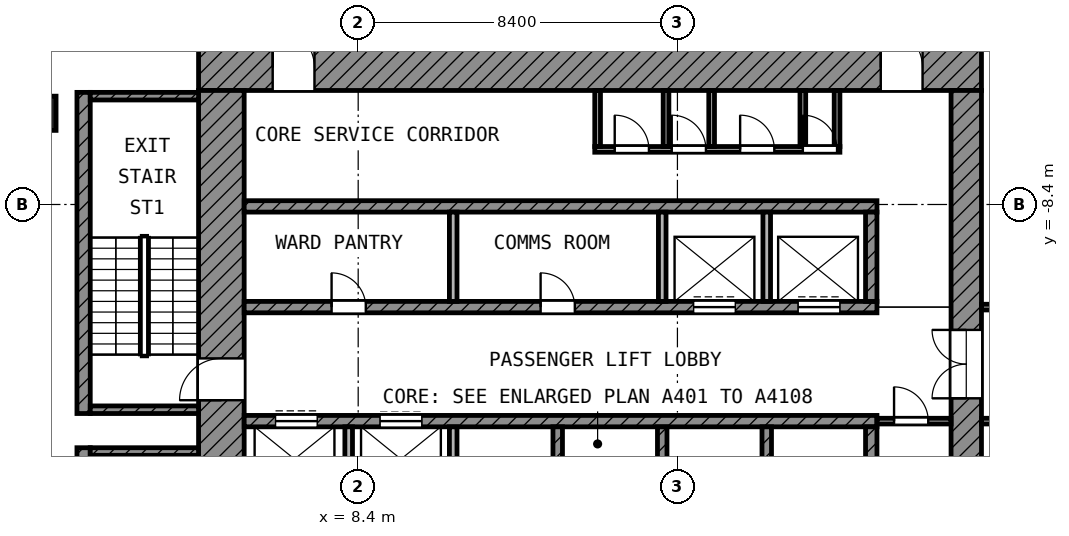
"""IFC4 building model, lengths in metres.
Left out: names, types, materials, properties, quantities, classifications, styles, units other than length and angle.
Written with IfcOpenShell. Run it as: python <this file> out.ifc"""

import sys

from ifc_helpers import new_model, si_unit, direction, frame, frame_2d, origin, origin_2d, place, context, subcontext, project, spatial, rectangle, extrude, element, fill, save


model = new_model("IFC4")
c1 = context("Model", 3, precision=1e-05, world=origin(), true_north=direction((0.0, 1.0)))
c2 = subcontext(c1, "Body", "Model", "MODEL_VIEW")
j1 = project(units=[si_unit("LENGTHUNIT", "METRE"), si_unit("PLANEANGLEUNIT", "RADIAN")], contexts=[c1])
p1 = place(None, origin())
s1 = spatial("IfcSite", under=j1, at=p1, CompositionType="ELEMENT")
p2 = place(p1, origin())
s2 = spatial("IfcBuilding", under=s1, at=p2, CompositionType="ELEMENT")
p3 = place(p2, frame((0.0, 0.0, 234.8)))
s3 = spatial("IfcBuildingStorey", under=s2, at=p3, CompositionType="ELEMENT", Elevation=234.8)
p4 = place(p3, frame((0.0, -6.0, 0.0), z_axis=(0.0, 0.0, 1.0), x_axis=(1.0, 0.0, 0.0)))
e1 = element("IfcColumn", 1, at=p4, inside=s3, PredefinedType="COLUMN", context=c2, shape_type="SweptSolid", body=[
    extrude(rectangle(XDim=0.9, YDim=0.9, at=origin_2d()), origin(), (0.0, 0.0, 1.0), 4.2),
])
p5 = place(p3, frame((4.2, -4.8, 0.0), z_axis=(0.0, 0.0, 1.0), x_axis=(1.0, 0.0, 0.0)))
e2 = element("IfcWall", 2, at=p5, inside=s3, PredefinedType="SHEAR", context=c2, shape_type="SweptSolid", body=[
    extrude(rectangle(XDim=20.6, YDim=1.2, at=frame_2d((10.3, 0.0))), origin(), (0.0, 0.0, 1.0), 3.6),
])
p6 = place(p5, frame((1.95, 0.0, 0.0)))
e3 = element("IfcOpeningElement", 3, at=p6, cuts=e2, PredefinedType="OPENING", context=c2, shape_type="SweptSolid", body=[
    extrude(rectangle(XDim=1.1, YDim=2.1, at=frame_2d((0.55, 1.05))), frame((0.0, 0.61, 0.0), z_axis=(0.0, -1.0, 0.0), x_axis=(1.0, 0.0, 0.0)), (0.0, 0.0, 1.0), 1.22),
])
p7 = place(p5, frame((17.95, 0.0, 0.0)))
e4 = element("IfcOpeningElement", 4, at=p7, cuts=e2, PredefinedType="OPENING", context=c2, shape_type="SweptSolid", body=[
    extrude(rectangle(XDim=1.1, YDim=2.1, at=frame_2d((0.55, 1.05))), frame((0.0, 0.61, 0.0), z_axis=(0.0, -1.0, 0.0), x_axis=(1.0, 0.0, 0.0)), (0.0, 0.0, 1.0), 1.22),
])
p8 = place(p3, frame((4.8, -24.8, 0.0), z_axis=(0.0, 0.0, 1.0), x_axis=(0.0, 1.0, 0.0)))
e5 = element("IfcWall", 5, at=p8, inside=s3, PredefinedType="SHEAR", context=c2, shape_type="SweptSolid", body=[
    extrude(rectangle(XDim=19.4, YDim=1.2, at=frame_2d((9.7, 0.0))), origin(), (0.0, 0.0, 1.0), 3.6),
])
p9 = place(p8, frame((11.25, 0.0, 0.0)))
e6 = element("IfcOpeningElement", 6, at=p9, cuts=e5, PredefinedType="OPENING", context=c2, shape_type="SweptSolid", body=[
    extrude(rectangle(XDim=1.1, YDim=2.1, at=frame_2d((0.55, 1.05))), frame((0.0, 0.61, 0.0), z_axis=(0.0, -1.0, 0.0), x_axis=(1.0, 0.0, 0.0)), (0.0, 0.0, 1.0), 1.22),
])
p10 = place(p8, frame((1.95, 0.0, 0.0)))
e7 = element("IfcOpeningElement", 7, at=p10, cuts=e5, PredefinedType="OPENING", context=c2, shape_type="SweptSolid", body=[
    extrude(rectangle(XDim=1.1, YDim=2.1, at=frame_2d((0.55, 1.05))), frame((0.0, 0.61, 0.0), z_axis=(0.0, -1.0, 0.0), x_axis=(1.0, 0.0, 0.0)), (0.0, 0.0, 1.0), 1.22),
])
p11 = place(p3, frame((24.4, -24.0, 0.0), z_axis=(0.0, 0.0, 1.0), x_axis=(0.0, 1.0, 0.0)))
e8 = element("IfcWall", 8, at=p11, inside=s3, PredefinedType="SHEAR", context=c2, shape_type="SweptSolid", body=[
    extrude(rectangle(XDim=18.6, YDim=0.8, at=frame_2d((9.3, 0.0))), origin(), (0.0, 0.0, 1.0), 3.6),
])
p12 = place(p11, frame((10.5, 0.0, 0.0)))
e9 = element("IfcOpeningElement", 9, at=p12, cuts=e8, PredefinedType="OPENING", context=c2, shape_type="SweptSolid", body=[
    extrude(rectangle(XDim=1.8, YDim=2.1, at=frame_2d((0.9, 1.05))), frame((0.0, 0.41, 0.0), z_axis=(0.0, -1.0, 0.0), x_axis=(1.0, 0.0, 0.0)), (0.0, 0.0, 1.0), 0.82),
])
p13 = place(p3, frame((5.4, -8.45, 0.0), z_axis=(0.0, 0.0, 1.0), x_axis=(1.0, 0.0, 0.0)))
e10 = element("IfcWall", 10, at=p13, inside=s3, PredefinedType="SHEAR", context=c2, shape_type="SweptSolid", body=[
    extrude(rectangle(XDim=16.65, YDim=0.3, at=frame_2d((8.325, 0.0))), origin(), (0.0, 0.0, 1.0), 3.6),
])
p14 = place(p3, frame((5.4, -11.1, 0.0), z_axis=(0.0, 0.0, 1.0), x_axis=(1.0, 0.0, 0.0)))
e11 = element("IfcWall", 11, at=p14, inside=s3, PredefinedType="SHEAR", context=c2, shape_type="SweptSolid", body=[
    extrude(rectangle(XDim=16.65, YDim=0.3, at=frame_2d((8.325, 0.0))), origin(), (0.0, 0.0, 1.0), 3.6),
])
p15 = place(p14, frame((11.825, 0.0, 0.0)))
e12 = element("IfcOpeningElement", 12, at=p15, cuts=e11, PredefinedType="OPENING", context=c2, shape_type="SweptSolid", body=[
    extrude(rectangle(XDim=1.1, YDim=2.1, at=frame_2d((0.55, 1.05))), frame((0.0, 0.16, 0.0), z_axis=(0.0, -1.0, 0.0), x_axis=(1.0, 0.0, 0.0)), (0.0, 0.0, 1.0), 0.32),
])
p16 = place(p14, frame((14.575, 0.0, 0.0)))
e13 = element("IfcOpeningElement", 13, at=p16, cuts=e11, PredefinedType="OPENING", context=c2, shape_type="SweptSolid", body=[
    extrude(rectangle(XDim=1.1, YDim=2.1, at=frame_2d((0.55, 1.05))), frame((0.0, 0.16, 0.0), z_axis=(0.0, -1.0, 0.0), x_axis=(1.0, 0.0, 0.0)), (0.0, 0.0, 1.0), 0.32),
])
p17 = place(p14, frame((2.3, 0.0, 0.0)))
e14 = element("IfcOpeningElement", 14, at=p17, cuts=e11, PredefinedType="OPENING", context=c2, shape_type="SweptSolid", body=[
    extrude(rectangle(XDim=0.9, YDim=2.1, at=frame_2d((0.45, 1.05))), frame((0.0, 0.16, 0.0), z_axis=(0.0, -1.0, 0.0), x_axis=(1.0, 0.0, 0.0)), (0.0, 0.0, 1.0), 0.32),
])
p18 = place(p14, frame((7.8, 0.0, 0.0)))
e15 = element("IfcOpeningElement", 15, at=p18, cuts=e11, PredefinedType="OPENING", context=c2, shape_type="SweptSolid", body=[
    extrude(rectangle(XDim=0.9, YDim=2.1, at=frame_2d((0.45, 1.05))), frame((0.0, 0.16, 0.0), z_axis=(0.0, -1.0, 0.0), x_axis=(1.0, 0.0, 0.0)), (0.0, 0.0, 1.0), 0.32),
])
p19 = place(p3, frame((5.4, -14.1, 0.0), z_axis=(0.0, 0.0, 1.0), x_axis=(1.0, 0.0, 0.0)))
e16 = element("IfcWall", 16, at=p19, inside=s3, PredefinedType="SHEAR", context=c2, shape_type="SweptSolid", body=[
    extrude(rectangle(XDim=16.65, YDim=0.3, at=frame_2d((8.325, 0.0))), origin(), (0.0, 0.0, 1.0), 3.6),
])
p20 = place(p19, frame((0.825, 0.0, 0.0)))
e17 = element("IfcOpeningElement", 17, at=p20, cuts=e16, PredefinedType="OPENING", context=c2, shape_type="SweptSolid", body=[
    extrude(rectangle(XDim=1.1, YDim=2.1, at=frame_2d((0.55, 1.05))), frame((0.0, 0.16, 0.0), z_axis=(0.0, -1.0, 0.0), x_axis=(1.0, 0.0, 0.0)), (0.0, 0.0, 1.0), 0.32),
])
p21 = place(p19, frame((3.575, 0.0, 0.0)))
e18 = element("IfcOpeningElement", 18, at=p21, cuts=e16, PredefinedType="OPENING", context=c2, shape_type="SweptSolid", body=[
    extrude(rectangle(XDim=1.1, YDim=2.1, at=frame_2d((0.55, 1.05))), frame((0.0, 0.16, 0.0), z_axis=(0.0, -1.0, 0.0), x_axis=(1.0, 0.0, 0.0)), (0.0, 0.0, 1.0), 0.32),
])
p22 = place(p3, frame((21.9, -10.95, 0.0), z_axis=(0.0, 0.0, 1.0), x_axis=(0.0, 1.0, 0.0)))
e19 = element("IfcWall", 19, at=p22, inside=s3, PredefinedType="SHEAR", context=c2, shape_type="SweptSolid", body=[
    extrude(rectangle(XDim=2.35, YDim=0.3, at=frame_2d((1.175, 0.0))), origin(), (0.0, 0.0, 1.0), 3.6),
])
p23 = place(p3, frame((21.9, -16.6, 0.0), z_axis=(0.0, 0.0, 1.0), x_axis=(0.0, 1.0, 0.0)))
e20 = element("IfcWall", 20, at=p23, inside=s3, PredefinedType="SHEAR", context=c2, shape_type="SweptSolid", body=[
    extrude(rectangle(XDim=2.35, YDim=0.3, at=frame_2d((1.175, 0.0))), origin(), (0.0, 0.0, 1.0), 3.6),
])
for number, where, z_axis, x_axis in (
    (21, (10.9, -10.95, 0.0), (0.0, 0.0, 1.0), (0.0, 1.0, 0.0)),
    (22, (16.4, -10.95, 0.0), (0.0, 0.0, 1.0), (0.0, 1.0, 0.0)),
    (23, (19.15, -10.95, 0.0), (0.0, 0.0, 1.0), (0.0, 1.0, 0.0)),
):
    element("IfcWall", number, at=place(p3, frame(where, z_axis=z_axis, x_axis=x_axis)), inside=s3, PredefinedType="PARTITIONING", context=c2, shape_type="SweptSolid", body=[
        extrude(rectangle(XDim=2.35, YDim=0.2, at=frame_2d((1.175, 0.0))), origin(), (0.0, 0.0, 1.0), 3.6),
    ])
for number, where, z_axis, x_axis in (
    (24, (8.15, -16.6, 0.0), (0.0, 0.0, 1.0), (0.0, 1.0, 0.0)),
    (25, (10.9, -16.6, 0.0), (0.0, 0.0, 1.0), (0.0, 1.0, 0.0)),
):
    element("IfcWall", number, at=place(p3, frame(where, z_axis=z_axis, x_axis=x_axis)), inside=s3, PredefinedType="PARTITIONING", context=c2, shape_type="SweptSolid", body=[
        extrude(rectangle(XDim=2.35, YDim=0.2, at=frame_2d((1.175, 0.0))), origin(), (0.0, 0.0, 1.0), 3.6),
    ])
for number, where, z_axis, x_axis in (
    (26, (13.65, -16.6, 0.0), (0.0, 0.0, 1.0), (0.0, 1.0, 0.0)),
    (27, (16.4, -16.6, 0.0), (0.0, 0.0, 1.0), (0.0, 1.0, 0.0)),
    (28, (19.15, -16.6, 0.0), (0.0, 0.0, 1.0), (0.0, 1.0, 0.0)),
):
    element("IfcWall", number, at=place(p3, frame(where, z_axis=z_axis, x_axis=x_axis)), inside=s3, PredefinedType="SHEAR", context=c2, shape_type="SweptSolid", body=[
        extrude(rectangle(XDim=2.35, YDim=0.25, at=frame_2d((1.175, 0.0))), origin(), (0.0, 0.0, 1.0), 3.6),
    ])
p24 = place(p3, frame((22.05, -14.1, 0.0), z_axis=(0.0, 0.0, 1.0), x_axis=(1.0, 0.0, 0.0)))
e29 = element("IfcWall", 29, at=p24, inside=s3, PredefinedType="PARTITIONING", context=c2, shape_type="SweptSolid", body=[
    extrude(rectangle(XDim=1.95, YDim=0.15, at=frame_2d((0.975, 0.0))), origin(), (0.0, 0.0, 1.0), 3.6),
])
p25 = place(p24, frame((0.45, 0.0, 0.0)))
e30 = element("IfcOpeningElement", 30, at=p25, cuts=e29, PredefinedType="OPENING", context=c2, shape_type="SweptSolid", body=[
    extrude(rectangle(XDim=0.9, YDim=2.1, at=frame_2d((0.45, 1.05))), frame((0.0, 0.085, 0.0), z_axis=(0.0, -1.0, 0.0), x_axis=(1.0, 0.0, 0.0)), (0.0, 0.0, 1.0), 0.17),
])
p26 = place(p3, frame((14.625, -6.95, 0.0), z_axis=(0.0, 0.0, 1.0), x_axis=(1.0, 0.0, 0.0)))
e31 = element("IfcWall", 31, at=p26, inside=s3, PredefinedType="PARTITIONING", context=c2, shape_type="SweptSolid", body=[
    extrude(rectangle(XDim=6.45, YDim=0.15, at=frame_2d((3.225, 0.0))), origin(), (0.0, 0.0, 1.0), 3.6),
])
p27 = place(p26, frame((0.525, 0.0, 0.0)))
e32 = element("IfcOpeningElement", 32, at=p27, cuts=e31, PredefinedType="OPENING", context=c2, shape_type="SweptSolid", body=[
    extrude(rectangle(XDim=0.9, YDim=2.1, at=frame_2d((0.45, 1.05))), frame((0.0, 0.085, 0.0), z_axis=(0.0, -1.0, 0.0), x_axis=(1.0, 0.0, 0.0)), (0.0, 0.0, 1.0), 0.17),
])
p28 = place(p26, frame((2.025, 0.0, 0.0)))
e33 = element("IfcOpeningElement", 33, at=p28, cuts=e31, PredefinedType="OPENING", context=c2, shape_type="SweptSolid", body=[
    extrude(rectangle(XDim=0.9, YDim=2.1, at=frame_2d((0.45, 1.05))), frame((0.0, 0.085, 0.0), z_axis=(0.0, -1.0, 0.0), x_axis=(1.0, 0.0, 0.0)), (0.0, 0.0, 1.0), 0.17),
])
p29 = place(p26, frame((3.825, 0.0, 0.0)))
e34 = element("IfcOpeningElement", 34, at=p29, cuts=e31, PredefinedType="OPENING", context=c2, shape_type="SweptSolid", body=[
    extrude(rectangle(XDim=0.9, YDim=2.1, at=frame_2d((0.45, 1.05))), frame((0.0, 0.085, 0.0), z_axis=(0.0, -1.0, 0.0), x_axis=(1.0, 0.0, 0.0)), (0.0, 0.0, 1.0), 0.17),
])
p30 = place(p26, frame((5.475, 0.0, 0.0)))
e35 = element("IfcOpeningElement", 35, at=p30, cuts=e31, PredefinedType="OPENING", context=c2, shape_type="SweptSolid", body=[
    extrude(rectangle(XDim=0.9, YDim=2.1, at=frame_2d((0.45, 1.05))), frame((0.0, 0.085, 0.0), z_axis=(0.0, -1.0, 0.0), x_axis=(1.0, 0.0, 0.0)), (0.0, 0.0, 1.0), 0.17),
])
for number, where, z_axis, x_axis in (
    (36, (14.7, -6.875, 0.0), (0.0, 0.0, 1.0), (0.0, 1.0, 0.0)),
    (37, (16.5, -6.875, 0.0), (0.0, 0.0, 1.0), (0.0, 1.0, 0.0)),
    (38, (17.7, -6.875, 0.0), (0.0, 0.0, 1.0), (0.0, 1.0, 0.0)),
    (39, (20.1, -6.875, 0.0), (0.0, 0.0, 1.0), (0.0, 1.0, 0.0)),
    (40, (21.0, -6.875, 0.0), (0.0, 0.0, 1.0), (0.0, 1.0, 0.0)),
):
    element("IfcWall", number, at=place(p3, frame(where, z_axis=z_axis, x_axis=x_axis)), inside=s3, PredefinedType="PARTITIONING", context=c2, shape_type="SweptSolid", body=[
        extrude(rectangle(XDim=1.475, YDim=0.15, at=frame_2d((0.738, 0.0))), origin(), (0.0, 0.0, 1.0), 3.6),
    ])
p31 = place(p3, frame((1.175, -13.9, 0.0), z_axis=(0.0, 0.0, 1.0), x_axis=(0.0, 1.0, 0.0)))
e41 = element("IfcWall", 41, at=p31, inside=s3, PredefinedType="SHEAR", context=c2, shape_type="SweptSolid", body=[
    extrude(rectangle(XDim=8.45, YDim=0.35, at=frame_2d((4.225, 0.0))), origin(), (0.0, 0.0, 1.0), 3.6),
])
for number, where, z_axis, x_axis in (
    (42, (1.35, -5.55, 0.0), (0.0, 0.0, 1.0), (1.0, 0.0, 0.0)),
    (43, (1.35, -13.8, 0.0), (0.0, 0.0, 1.0), (1.0, 0.0, 0.0)),
):
    element("IfcWall", number, at=place(p3, frame(where, z_axis=z_axis, x_axis=x_axis)), inside=s3, PredefinedType="SHEAR", context=c2, shape_type="SweptSolid", body=[
        extrude(rectangle(XDim=2.85, YDim=0.2, at=frame_2d((1.425, 0.0))), origin(), (0.0, 0.0, 1.0), 3.6),
    ])
p32 = place(p3, frame((1.175, -23.25, 0.0), z_axis=(0.0, 0.0, 1.0), x_axis=(0.0, 1.0, 0.0)))
e44 = element("IfcWall", 44, at=p32, inside=s3, PredefinedType="SHEAR", context=c2, shape_type="SweptSolid", body=[
    extrude(rectangle(XDim=8.45, YDim=0.35, at=frame_2d((4.225, 0.0))), origin(), (0.0, 0.0, 1.0), 3.6),
])
p33 = place(p3, frame((1.35, -14.9, 0.0), z_axis=(0.0, 0.0, 1.0), x_axis=(1.0, 0.0, 0.0)))
e45 = element("IfcWall", 45, at=p33, inside=s3, PredefinedType="SHEAR", context=c2, shape_type="SweptSolid", body=[
    extrude(rectangle(XDim=2.85, YDim=0.2, at=frame_2d((1.425, 0.0))), origin(), (0.0, 0.0, 1.0), 3.6),
])
p34 = place(p3, frame((24.8, -14.1, 0.0), z_axis=(0.0, 0.0, 1.0), x_axis=(1.0, 0.0, 0.0)))
e46 = element("IfcWall", 46, at=p34, inside=s3, PredefinedType="PARTITIONING", context=c2, shape_type="SweptSolid", body=[
    extrude(rectangle(XDim=4.525, YDim=0.15, at=frame_2d((2.262, 0.0))), origin(), (0.0, 0.0, 1.0), 3.6),
])
p35 = place(p34, frame((1.75, 0.0, 0.0)))
e47 = element("IfcOpeningElement", 47, at=p35, cuts=e46, PredefinedType="OPENING", context=c2, shape_type="SweptSolid", body=[
    extrude(rectangle(XDim=1.5, YDim=2.1, at=frame_2d((0.75, 1.05))), frame((0.0, 0.085, 0.0), z_axis=(0.0, -1.0, 0.0), x_axis=(1.0, 0.0, 0.0)), (0.0, 0.0, 1.0), 0.17),
])
p36 = place(p3, frame((24.8, -11.1, 0.0), z_axis=(0.0, 0.0, 1.0), x_axis=(1.0, 0.0, 0.0)))
e48 = element("IfcWall", 48, at=p36, inside=s3, PredefinedType="PARTITIONING", context=c2, shape_type="SweptSolid", body=[
    extrude(rectangle(XDim=4.525, YDim=0.15, at=frame_2d((2.262, 0.0))), origin(), (0.0, 0.0, 1.0), 3.6),
])
p37 = place(p36, frame((1.0, 0.0, 0.0)))
e49 = element("IfcOpeningElement", 49, at=p37, cuts=e48, PredefinedType="OPENING", context=c2, shape_type="SweptSolid", body=[
    extrude(rectangle(XDim=0.9, YDim=2.1, at=frame_2d((0.45, 1.05))), frame((0.0, 0.085, 0.0), z_axis=(0.0, -1.0, 0.0), x_axis=(1.0, 0.0, 0.0)), (0.0, 0.0, 1.0), 0.17),
])
p38 = place(p36, frame((3.05, 0.0, 0.0)))
e50 = element("IfcOpeningElement", 50, at=p38, cuts=e48, PredefinedType="OPENING", context=c2, shape_type="SweptSolid", body=[
    extrude(rectangle(XDim=1.0, YDim=2.1, at=frame_2d((0.5, 1.05))), frame((0.0, 0.085, 0.0), z_axis=(0.0, -1.0, 0.0), x_axis=(1.0, 0.0, 0.0)), (0.0, 0.0, 1.0), 0.17),
])
p39 = place(p15, origin())
e51 = element("IfcDoor", 51, at=p39, inside=s3, OperationType="DOUBLE_DOOR_SLIDING", PredefinedType="DOOR", context=c2, shape_type="SweptSolid", body=[
    extrude(rectangle(XDim=1.1, YDim=2.1, at=frame_2d((0.55, 1.05))), frame((0.0, 0.025, 0.0), z_axis=(0.0, -1.0, 0.0), x_axis=(1.0, 0.0, 0.0)), (0.0, 0.0, 1.0), 0.05),
])
fill(e12, e51)
p40 = place(p16, origin())
e52 = element("IfcDoor", 52, at=p40, inside=s3, OperationType="DOUBLE_DOOR_SLIDING", PredefinedType="DOOR", context=c2, shape_type="SweptSolid", body=[
    extrude(rectangle(XDim=1.1, YDim=2.1, at=frame_2d((0.55, 1.05))), frame((0.0, 0.025, 0.0), z_axis=(0.0, -1.0, 0.0), x_axis=(1.0, 0.0, 0.0)), (0.0, 0.0, 1.0), 0.05),
])
fill(e13, e52)
p41 = place(p20, origin())
e53 = element("IfcDoor", 53, at=p41, inside=s3, OperationType="DOUBLE_DOOR_SLIDING", PredefinedType="DOOR", context=c2, shape_type="SweptSolid", body=[
    extrude(rectangle(XDim=1.1, YDim=2.1, at=frame_2d((0.55, 1.05))), frame((0.0, 0.025, 0.0), z_axis=(0.0, -1.0, 0.0), x_axis=(1.0, 0.0, 0.0)), (0.0, 0.0, 1.0), 0.05),
])
fill(e17, e53)
p42 = place(p21, origin())
e54 = element("IfcDoor", 54, at=p42, inside=s3, OperationType="DOUBLE_DOOR_SLIDING", PredefinedType="DOOR", context=c2, shape_type="SweptSolid", body=[
    extrude(rectangle(XDim=1.1, YDim=2.1, at=frame_2d((0.55, 1.05))), frame((0.0, 0.025, 0.0), z_axis=(0.0, -1.0, 0.0), x_axis=(1.0, 0.0, 0.0)), (0.0, 0.0, 1.0), 0.05),
])
fill(e18, e54)
p43 = place(p9, origin())
e55 = element("IfcDoor", 55, at=p43, inside=s3, OperationType="SINGLE_SWING_LEFT", PredefinedType="DOOR", context=c2, shape_type="SweptSolid", body=[
    extrude(rectangle(XDim=1.1, YDim=2.1, at=frame_2d((0.55, 1.05))), frame((0.0, 0.025, 0.0), z_axis=(0.0, -1.0, 0.0), x_axis=(1.0, 0.0, 0.0)), (0.0, 0.0, 1.0), 0.05),
])
fill(e6, e55)
p44 = place(p6, origin())
e56 = element("IfcDoor", 56, at=p44, inside=s3, OperationType="SINGLE_SWING_LEFT", PredefinedType="DOOR", context=c2, shape_type="SweptSolid", body=[
    extrude(rectangle(XDim=1.1, YDim=2.1, at=frame_2d((0.55, 1.05))), frame((0.0, 0.025, 0.0), z_axis=(0.0, -1.0, 0.0), x_axis=(1.0, 0.0, 0.0)), (0.0, 0.0, 1.0), 0.05),
])
fill(e3, e56)
p45 = place(p7, origin())
e57 = element("IfcDoor", 57, at=p45, inside=s3, OperationType="SINGLE_SWING_LEFT", PredefinedType="DOOR", context=c2, shape_type="SweptSolid", body=[
    extrude(rectangle(XDim=1.1, YDim=2.1, at=frame_2d((0.55, 1.05))), frame((0.0, 0.025, 0.0), z_axis=(0.0, -1.0, 0.0), x_axis=(1.0, 0.0, 0.0)), (0.0, 0.0, 1.0), 0.05),
])
fill(e4, e57)
p46 = place(p12, origin())
e58 = element("IfcDoor", 58, at=p46, inside=s3, OperationType="DOUBLE_DOOR_SINGLE_SWING", PredefinedType="DOOR", context=c2, shape_type="SweptSolid", body=[
    extrude(rectangle(XDim=1.8, YDim=2.1, at=frame_2d((0.9, 1.05))), frame((0.0, 0.025, 0.0), z_axis=(0.0, -1.0, 0.0), x_axis=(1.0, 0.0, 0.0)), (0.0, 0.0, 1.0), 0.05),
])
fill(e9, e58)
p47 = place(p27, origin())
e59 = element("IfcDoor", 59, at=p47, inside=s3, OperationType="SINGLE_SWING_LEFT", PredefinedType="DOOR", context=c2, shape_type="SweptSolid", body=[
    extrude(rectangle(XDim=0.9, YDim=2.1, at=frame_2d((0.45, 1.05))), frame((0.0, 0.025, 0.0), z_axis=(0.0, -1.0, 0.0), x_axis=(1.0, 0.0, 0.0)), (0.0, 0.0, 1.0), 0.05),
])
fill(e32, e59)
p48 = place(p28, origin())
e60 = element("IfcDoor", 60, at=p48, inside=s3, OperationType="SINGLE_SWING_LEFT", PredefinedType="DOOR", context=c2, shape_type="SweptSolid", body=[
    extrude(rectangle(XDim=0.9, YDim=2.1, at=frame_2d((0.45, 1.05))), frame((0.0, 0.025, 0.0), z_axis=(0.0, -1.0, 0.0), x_axis=(1.0, 0.0, 0.0)), (0.0, 0.0, 1.0), 0.05),
])
fill(e33, e60)
p49 = place(p29, origin())
e61 = element("IfcDoor", 61, at=p49, inside=s3, OperationType="SINGLE_SWING_LEFT", PredefinedType="DOOR", context=c2, shape_type="SweptSolid", body=[
    extrude(rectangle(XDim=0.9, YDim=2.1, at=frame_2d((0.45, 1.05))), frame((0.0, 0.025, 0.0), z_axis=(0.0, -1.0, 0.0), x_axis=(1.0, 0.0, 0.0)), (0.0, 0.0, 1.0), 0.05),
])
fill(e34, e61)
p50 = place(p30, origin())
e62 = element("IfcDoor", 62, at=p50, inside=s3, OperationType="SINGLE_SWING_LEFT", PredefinedType="DOOR", context=c2, shape_type="SweptSolid", body=[
    extrude(rectangle(XDim=0.9, YDim=2.1, at=frame_2d((0.45, 1.05))), frame((0.0, 0.025, 0.0), z_axis=(0.0, -1.0, 0.0), x_axis=(1.0, 0.0, 0.0)), (0.0, 0.0, 1.0), 0.05),
])
fill(e35, e62)
p51 = place(p25, origin())
e63 = element("IfcDoor", 63, at=p51, inside=s3, OperationType="SINGLE_SWING_LEFT", PredefinedType="DOOR", context=c2, shape_type="SweptSolid", body=[
    extrude(rectangle(XDim=0.9, YDim=2.1, at=frame_2d((0.45, 1.05))), frame((0.0, 0.025, 0.0), z_axis=(0.0, -1.0, 0.0), x_axis=(1.0, 0.0, 0.0)), (0.0, 0.0, 1.0), 0.05),
])
fill(e30, e63)
p52 = place(p17, origin())
e64 = element("IfcDoor", 64, at=p52, inside=s3, OperationType="SINGLE_SWING_LEFT", PredefinedType="DOOR", context=c2, shape_type="SweptSolid", body=[
    extrude(rectangle(XDim=0.9, YDim=2.1, at=frame_2d((0.45, 1.05))), frame((0.0, 0.025, 0.0), z_axis=(0.0, -1.0, 0.0), x_axis=(1.0, 0.0, 0.0)), (0.0, 0.0, 1.0), 0.05),
])
fill(e14, e64)
p53 = place(p18, origin())
e65 = element("IfcDoor", 65, at=p53, inside=s3, OperationType="SINGLE_SWING_LEFT", PredefinedType="DOOR", context=c2, shape_type="SweptSolid", body=[
    extrude(rectangle(XDim=0.9, YDim=2.1, at=frame_2d((0.45, 1.05))), frame((0.0, 0.025, 0.0), z_axis=(0.0, -1.0, 0.0), x_axis=(1.0, 0.0, 0.0)), (0.0, 0.0, 1.0), 0.05),
])
fill(e15, e65)
save(model, sys.argv[1])
